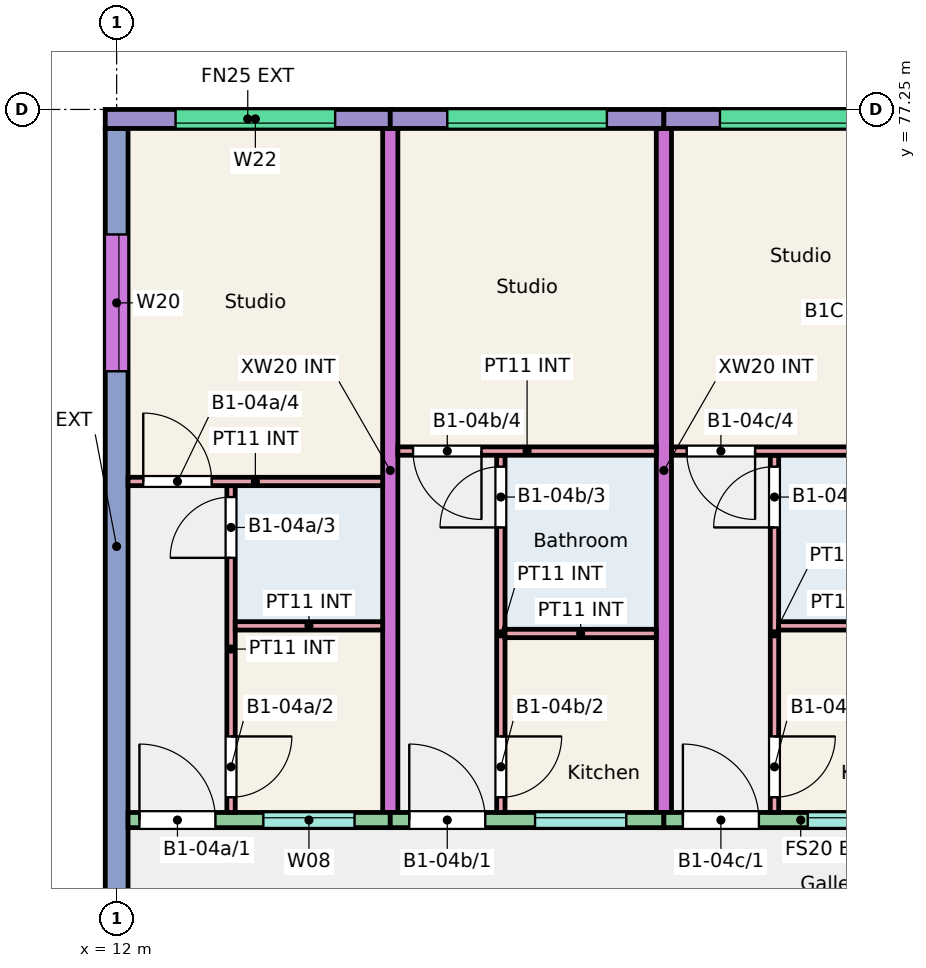
"""IFC4 building model, lengths in metres.
Left out: names, types, materials, properties, quantities, classifications, styles, units other than length and angle.
Written with IfcOpenShell. Run it as: python <this file> out.ifc"""

import sys

from ifc_helpers import new_model, si_unit, direction, frame, frame_2d, origin, place, context, subcontext, project, spatial, rectangle, extrude, element, fill, save


model = new_model("IFC4")
c1 = context("Model", 3, precision=1e-05, world=origin(), true_north=direction((0.0, 1.0)))
c2 = subcontext(c1, "Body", "Model", "MODEL_VIEW")
j1 = project(units=[si_unit("LENGTHUNIT", "METRE"), si_unit("PLANEANGLEUNIT", "RADIAN")], contexts=[c1])
p1 = place(None, origin())
s1 = spatial("IfcSite", under=j1, at=p1, CompositionType="ELEMENT")
p2 = place(p1, origin())
s2 = spatial("IfcBuilding", under=s1, at=p2, CompositionType="ELEMENT")
p3 = place(p2, frame((0.0, 0.0, 12.0)))
s3 = spatial("IfcBuildingStorey", under=s2, at=p3, CompositionType="ELEMENT", Elevation=12.0)
p4 = place(p3, frame((12.0, 66.0, 0.0), z_axis=(0.0, 0.0, 1.0), x_axis=(0.0, 1.0, 0.0)))
e1 = element("IfcWall", 1, at=p4, inside=s3, PredefinedType="SHEAR", context=c2, shape_type="SweptSolid", body=[
    extrude(rectangle(XDim=11.0, YDim=0.3, at=frame_2d((5.5, 0.0))), origin(), (0.0, 0.0, 1.0), 3.0),
])
p5 = place(p4, frame((7.805, 0.0, 0.9)))
e2 = element("IfcOpeningElement", 2, at=p5, cuts=e1, PredefinedType="OPENING", context=c2, shape_type="SweptSolid", body=[
    extrude(rectangle(XDim=1.8, YDim=1.5, at=frame_2d((0.9, 0.75))), frame((0.0, 0.16, 0.0), z_axis=(0.0, -1.0, 0.0), x_axis=(1.0, 0.0, 0.0)), (0.0, 0.0, 1.0), 0.32),
])
for number, where, z_axis, x_axis in (
    (3, (15.6, 68.0, 0.0), (0.0, 0.0, 1.0), (0.0, 1.0, 0.0)),
    (4, (19.2, 68.0, 0.0), (0.0, 0.0, 1.0), (0.0, 1.0, 0.0)),
):
    element("IfcWall", number, at=place(p3, frame(where, z_axis=z_axis, x_axis=x_axis)), inside=s3, PredefinedType="SHEAR", context=c2, shape_type="SweptSolid", body=[
        extrude(rectangle(XDim=9.0, YDim=0.2, at=frame_2d((4.5, 0.0))), origin(), (0.0, 0.0, 1.0), 3.0),
    ])
p6 = place(p3, frame((11.85, 77.125, 0.0), z_axis=(0.0, 0.0, 1.0), x_axis=(1.0, 0.0, 0.0)))
e5 = element("IfcWall", 5, at=p6, inside=s3, PredefinedType="SOLIDWALL", context=c2, shape_type="SweptSolid", body=[
    extrude(rectangle(XDim=3.75, YDim=0.25, at=frame_2d((1.875, 0.0))), origin(), (0.0, 0.0, 1.0), 3.0),
])
p7 = place(p6, frame((0.925, 0.0, 1.2)))
e6 = element("IfcOpeningElement", 6, at=p7, cuts=e5, PredefinedType="OPENING", context=c2, shape_type="SweptSolid", body=[
    extrude(rectangle(XDim=2.1, YDim=1.2, at=frame_2d((1.05, 0.6))), frame((0.0, 0.135, 0.0), z_axis=(0.0, -1.0, 0.0), x_axis=(1.0, 0.0, 0.0)), (0.0, 0.0, 1.0), 0.27),
])
p8 = place(p3, frame((12.15, 67.9, 0.0), z_axis=(0.0, 0.0, 1.0), x_axis=(1.0, 0.0, 0.0)))
e7 = element("IfcWall", 7, at=p8, inside=s3, PredefinedType="SOLIDWALL", context=c2, shape_type="SweptSolid", body=[
    extrude(rectangle(XDim=3.45, YDim=0.2, at=frame_2d((1.725, 0.0))), origin(), (0.0, 0.0, 1.0), 3.0),
])
p9 = place(p8, frame((1.78, 0.0, 1.1)))
e8 = element("IfcOpeningElement", 8, at=p9, cuts=e7, PredefinedType="OPENING", context=c2, shape_type="SweptSolid", body=[
    extrude(rectangle(XDim=1.2, YDim=1.3, at=frame_2d((0.6, 0.65))), frame((0.0, 0.11, 0.0), z_axis=(0.0, -1.0, 0.0), x_axis=(1.0, 0.0, 0.0)), (0.0, 0.0, 1.0), 0.22),
])
p10 = place(p8, frame((0.15, 0.0, 0.0)))
e9 = element("IfcOpeningElement", 9, at=p10, cuts=e7, PredefinedType="OPENING", context=c2, shape_type="SweptSolid", body=[
    extrude(rectangle(XDim=1.0, YDim=2.1, at=frame_2d((0.5, 1.05))), frame((0.0, 0.11, 0.0), z_axis=(0.0, -1.0, 0.0), x_axis=(1.0, 0.0, 0.0)), (0.0, 0.0, 1.0), 0.22),
])
p11 = place(p3, frame((15.6, 77.125, 0.0), z_axis=(0.0, 0.0, 1.0), x_axis=(1.0, 0.0, 0.0)))
e10 = element("IfcWall", 10, at=p11, inside=s3, PredefinedType="SOLIDWALL", context=c2, shape_type="SweptSolid", body=[
    extrude(rectangle(XDim=3.6, YDim=0.25, at=frame_2d((1.8, 0.0))), origin(), (0.0, 0.0, 1.0), 3.0),
])
p12 = place(p11, frame((0.75, 0.0, 1.2)))
e11 = element("IfcOpeningElement", 11, at=p12, cuts=e10, PredefinedType="OPENING", context=c2, shape_type="SweptSolid", body=[
    extrude(rectangle(XDim=2.1, YDim=1.2, at=frame_2d((1.05, 0.6))), frame((0.0, 0.135, 0.0), z_axis=(0.0, -1.0, 0.0), x_axis=(1.0, 0.0, 0.0)), (0.0, 0.0, 1.0), 0.27),
])
p13 = place(p3, frame((15.6, 67.9, 0.0), z_axis=(0.0, 0.0, 1.0), x_axis=(1.0, 0.0, 0.0)))
e12 = element("IfcWall", 12, at=p13, inside=s3, PredefinedType="SOLIDWALL", context=c2, shape_type="SweptSolid", body=[
    extrude(rectangle(XDim=3.6, YDim=0.2, at=frame_2d((1.8, 0.0))), origin(), (0.0, 0.0, 1.0), 3.0),
])
p14 = place(p13, frame((1.905, 0.0, 1.1)))
e13 = element("IfcOpeningElement", 13, at=p14, cuts=e12, PredefinedType="OPENING", context=c2, shape_type="SweptSolid", body=[
    extrude(rectangle(XDim=1.2, YDim=1.3, at=frame_2d((0.6, 0.65))), frame((0.0, 0.11, 0.0), z_axis=(0.0, -1.0, 0.0), x_axis=(1.0, 0.0, 0.0)), (0.0, 0.0, 1.0), 0.22),
])
p15 = place(p13, frame((0.25, 0.0, 0.0)))
e14 = element("IfcOpeningElement", 14, at=p15, cuts=e12, PredefinedType="OPENING", context=c2, shape_type="SweptSolid", body=[
    extrude(rectangle(XDim=1.0, YDim=2.1, at=frame_2d((0.5, 1.05))), frame((0.0, 0.11, 0.0), z_axis=(0.0, -1.0, 0.0), x_axis=(1.0, 0.0, 0.0)), (0.0, 0.0, 1.0), 0.22),
])
p16 = place(p3, frame((19.2, 77.125, 0.0), z_axis=(0.0, 0.0, 1.0), x_axis=(1.0, 0.0, 0.0)))
e15 = element("IfcWall", 15, at=p16, inside=s3, PredefinedType="SOLIDWALL", context=c2, shape_type="SweptSolid", body=[
    extrude(rectangle(XDim=3.6, YDim=0.25, at=frame_2d((1.8, 0.0))), origin(), (0.0, 0.0, 1.0), 3.0),
])
p17 = place(p16, frame((0.738, 0.0, 1.2)))
e16 = element("IfcOpeningElement", 16, at=p17, cuts=e15, PredefinedType="OPENING", context=c2, shape_type="SweptSolid", body=[
    extrude(rectangle(XDim=2.1, YDim=1.2, at=frame_2d((1.05, 0.6))), frame((0.0, 0.135, 0.0), z_axis=(0.0, -1.0, 0.0), x_axis=(1.0, 0.0, 0.0)), (0.0, 0.0, 1.0), 0.27),
])
p18 = place(p3, frame((19.2, 67.9, 0.0), z_axis=(0.0, 0.0, 1.0), x_axis=(1.0, 0.0, 0.0)))
e17 = element("IfcWall", 17, at=p18, inside=s3, PredefinedType="SOLIDWALL", context=c2, shape_type="SweptSolid", body=[
    extrude(rectangle(XDim=3.6, YDim=0.2, at=frame_2d((1.8, 0.0))), origin(), (0.0, 0.0, 1.0), 3.0),
])
p19 = place(p18, frame((1.893, 0.0, 1.1)))
e18 = element("IfcOpeningElement", 18, at=p19, cuts=e17, PredefinedType="OPENING", context=c2, shape_type="SweptSolid", body=[
    extrude(rectangle(XDim=1.2, YDim=1.3, at=frame_2d((0.6, 0.65))), frame((0.0, 0.11, 0.0), z_axis=(0.0, -1.0, 0.0), x_axis=(1.0, 0.0, 0.0)), (0.0, 0.0, 1.0), 0.22),
])
p20 = place(p18, frame((0.25, 0.0, 0.0)))
e19 = element("IfcOpeningElement", 19, at=p20, cuts=e17, PredefinedType="OPENING", context=c2, shape_type="SweptSolid", body=[
    extrude(rectangle(XDim=1.0, YDim=2.1, at=frame_2d((0.5, 1.05))), frame((0.0, 0.11, 0.0), z_axis=(0.0, -1.0, 0.0), x_axis=(1.0, 0.0, 0.0)), (0.0, 0.0, 1.0), 0.22),
])
p21 = place(p3, frame((13.505, 68.0, 0.0), z_axis=(0.0, 0.0, 1.0), x_axis=(0.0, 1.0, 0.0)))
e20 = element("IfcWall", 20, at=p21, inside=s3, PredefinedType="PARTITIONING", context=c2, shape_type="SweptSolid", body=[
    extrude(rectangle(XDim=4.3, YDim=0.11, at=frame_2d((2.15, 0.0))), origin(), (0.0, 0.0, 1.0), 2.8),
])
p22 = place(p21, frame((0.2, 0.0, 0.0)))
e21 = element("IfcOpeningElement", 21, at=p22, cuts=e20, PredefinedType="OPENING", context=c2, shape_type="SweptSolid", body=[
    extrude(rectangle(XDim=0.8, YDim=2.1, at=frame_2d((0.4, 1.05))), frame((0.0, 0.065, 0.0), z_axis=(0.0, -1.0, 0.0), x_axis=(1.0, 0.0, 0.0)), (0.0, 0.0, 1.0), 0.13),
])
p23 = place(p21, frame((3.35, 0.0, 0.0)))
e22 = element("IfcOpeningElement", 22, at=p23, cuts=e20, PredefinedType="OPENING", context=c2, shape_type="SweptSolid", body=[
    extrude(rectangle(XDim=0.8, YDim=2.1, at=frame_2d((0.4, 1.05))), frame((0.0, 0.065, 0.0), z_axis=(0.0, -1.0, 0.0), x_axis=(1.0, 0.0, 0.0)), (0.0, 0.0, 1.0), 0.13),
])
p24 = place(p3, frame((13.56, 70.455, 0.0), z_axis=(0.0, 0.0, 1.0), x_axis=(1.0, 0.0, 0.0)))
e23 = element("IfcWall", 23, at=p24, inside=s3, PredefinedType="PARTITIONING", context=c2, shape_type="SweptSolid", body=[
    extrude(rectangle(XDim=1.94, YDim=0.11, at=frame_2d((0.97, 0.0))), origin(), (0.0, 0.0, 1.0), 2.8),
])
p25 = place(p3, frame((12.15, 72.355, 0.0), z_axis=(0.0, 0.0, 1.0), x_axis=(1.0, 0.0, 0.0)))
e24 = element("IfcWall", 24, at=p25, inside=s3, PredefinedType="PARTITIONING", context=c2, shape_type="SweptSolid", body=[
    extrude(rectangle(XDim=3.35, YDim=0.11, at=frame_2d((1.675, 0.0))), origin(), (0.0, 0.0, 1.0), 2.8),
])
p26 = place(p25, frame((0.2, 0.0, 0.0)))
e25 = element("IfcOpeningElement", 25, at=p26, cuts=e24, PredefinedType="OPENING", context=c2, shape_type="SweptSolid", body=[
    extrude(rectangle(XDim=0.9, YDim=2.1, at=frame_2d((0.45, 1.05))), frame((0.0, 0.065, 0.0), z_axis=(0.0, -1.0, 0.0), x_axis=(1.0, 0.0, 0.0)), (0.0, 0.0, 1.0), 0.13),
])
p27 = place(p3, frame((17.055, 68.0, 0.0), z_axis=(0.0, 0.0, 1.0), x_axis=(0.0, 1.0, 0.0)))
e26 = element("IfcWall", 26, at=p27, inside=s3, PredefinedType="PARTITIONING", context=c2, shape_type="SweptSolid", body=[
    extrude(rectangle(XDim=4.7, YDim=0.11, at=frame_2d((2.35, 0.0))), origin(), (0.0, 0.0, 1.0), 2.8),
])
p28 = place(p27, frame((0.2, 0.0, 0.0)))
e27 = element("IfcOpeningElement", 27, at=p28, cuts=e26, PredefinedType="OPENING", context=c2, shape_type="SweptSolid", body=[
    extrude(rectangle(XDim=0.8, YDim=2.1, at=frame_2d((0.4, 1.05))), frame((0.0, 0.065, 0.0), z_axis=(0.0, -1.0, 0.0), x_axis=(1.0, 0.0, 0.0)), (0.0, 0.0, 1.0), 0.13),
])
p29 = place(p27, frame((3.75, 0.0, 0.0)))
e28 = element("IfcOpeningElement", 28, at=p29, cuts=e26, PredefinedType="OPENING", context=c2, shape_type="SweptSolid", body=[
    extrude(rectangle(XDim=0.8, YDim=2.1, at=frame_2d((0.4, 1.05))), frame((0.0, 0.065, 0.0), z_axis=(0.0, -1.0, 0.0), x_axis=(1.0, 0.0, 0.0)), (0.0, 0.0, 1.0), 0.13),
])
p30 = place(p3, frame((17.11, 70.355, 0.0), z_axis=(0.0, 0.0, 1.0), x_axis=(1.0, 0.0, 0.0)))
e29 = element("IfcWall", 29, at=p30, inside=s3, PredefinedType="PARTITIONING", context=c2, shape_type="SweptSolid", body=[
    extrude(rectangle(XDim=1.99, YDim=0.11, at=frame_2d((0.995, 0.0))), origin(), (0.0, 0.0, 1.0), 2.8),
])
p31 = place(p3, frame((15.7, 72.755, 0.0), z_axis=(0.0, 0.0, 1.0), x_axis=(1.0, 0.0, 0.0)))
e30 = element("IfcWall", 30, at=p31, inside=s3, PredefinedType="PARTITIONING", context=c2, shape_type="SweptSolid", body=[
    extrude(rectangle(XDim=3.4, YDim=0.11, at=frame_2d((1.7, 0.0))), origin(), (0.0, 0.0, 1.0), 2.8),
])
p32 = place(p31, frame((0.2, 0.0, 0.0)))
e31 = element("IfcOpeningElement", 31, at=p32, cuts=e30, PredefinedType="OPENING", context=c2, shape_type="SweptSolid", body=[
    extrude(rectangle(XDim=0.9, YDim=2.1, at=frame_2d((0.45, 1.05))), frame((0.0, 0.065, 0.0), z_axis=(0.0, -1.0, 0.0), x_axis=(1.0, 0.0, 0.0)), (0.0, 0.0, 1.0), 0.13),
])
p33 = place(p3, frame((20.655, 68.0, 0.0), z_axis=(0.0, 0.0, 1.0), x_axis=(0.0, 1.0, 0.0)))
e32 = element("IfcWall", 32, at=p33, inside=s3, PredefinedType="PARTITIONING", context=c2, shape_type="SweptSolid", body=[
    extrude(rectangle(XDim=4.7, YDim=0.11, at=frame_2d((2.35, 0.0))), origin(), (0.0, 0.0, 1.0), 2.8),
])
p34 = place(p33, frame((0.2, 0.0, 0.0)))
e33 = element("IfcOpeningElement", 33, at=p34, cuts=e32, PredefinedType="OPENING", context=c2, shape_type="SweptSolid", body=[
    extrude(rectangle(XDim=0.8, YDim=2.1, at=frame_2d((0.4, 1.05))), frame((0.0, 0.065, 0.0), z_axis=(0.0, -1.0, 0.0), x_axis=(1.0, 0.0, 0.0)), (0.0, 0.0, 1.0), 0.13),
])
p35 = place(p33, frame((3.75, 0.0, 0.0)))
e34 = element("IfcOpeningElement", 34, at=p35, cuts=e32, PredefinedType="OPENING", context=c2, shape_type="SweptSolid", body=[
    extrude(rectangle(XDim=0.8, YDim=2.1, at=frame_2d((0.4, 1.05))), frame((0.0, 0.065, 0.0), z_axis=(0.0, -1.0, 0.0), x_axis=(1.0, 0.0, 0.0)), (0.0, 0.0, 1.0), 0.13),
])
p36 = place(p3, frame((20.71, 70.455, 0.0), z_axis=(0.0, 0.0, 1.0), x_axis=(1.0, 0.0, 0.0)))
e35 = element("IfcWall", 35, at=p36, inside=s3, PredefinedType="PARTITIONING", context=c2, shape_type="SweptSolid", body=[
    extrude(rectangle(XDim=1.965, YDim=0.11, at=frame_2d((0.982, 0.0))), origin(), (0.0, 0.0, 1.0), 2.8),
])
p37 = place(p3, frame((19.3, 72.755, 0.0), z_axis=(0.0, 0.0, 1.0), x_axis=(1.0, 0.0, 0.0)))
e36 = element("IfcWall", 36, at=p37, inside=s3, PredefinedType="PARTITIONING", context=c2, shape_type="SweptSolid", body=[
    extrude(rectangle(XDim=3.375, YDim=0.11, at=frame_2d((1.688, 0.0))), origin(), (0.0, 0.0, 1.0), 2.8),
])
p38 = place(p37, frame((0.2, 0.0, 0.0)))
e37 = element("IfcOpeningElement", 37, at=p38, cuts=e36, PredefinedType="OPENING", context=c2, shape_type="SweptSolid", body=[
    extrude(rectangle(XDim=0.9, YDim=2.1, at=frame_2d((0.45, 1.05))), frame((0.0, 0.065, 0.0), z_axis=(0.0, -1.0, 0.0), x_axis=(1.0, 0.0, 0.0)), (0.0, 0.0, 1.0), 0.13),
])
p39 = place(p9, origin())
e38 = element("IfcWindow", 38, at=p39, inside=s3, PartitioningType="SINGLE_PANEL", PredefinedType="WINDOW", context=c2, shape_type="SweptSolid", body=[
    extrude(rectangle(XDim=1.2, YDim=1.3, at=frame_2d((0.6, 0.65))), frame((0.0, 0.06, 0.0), z_axis=(0.0, -1.0, 0.0), x_axis=(1.0, 0.0, 0.0)), (0.0, 0.0, 1.0), 0.06),
])
fill(e8, e38)
p40 = place(p7, origin())
e39 = element("IfcWindow", 39, at=p40, inside=s3, PartitioningType="SINGLE_PANEL", PredefinedType="WINDOW", context=c2, shape_type="SweptSolid", body=[
    extrude(rectangle(XDim=2.1, YDim=1.2, at=frame_2d((1.05, 0.6))), frame((0.0, -0.025, 0.0), z_axis=(0.0, -1.0, 0.0), x_axis=(1.0, 0.0, 0.0)), (0.0, 0.0, 1.0), 0.06),
])
fill(e6, e39)
p41 = place(p5, origin())
e40 = element("IfcWindow", 40, at=p41, inside=s3, PartitioningType="SINGLE_PANEL", PredefinedType="WINDOW", context=c2, shape_type="SweptSolid", body=[
    extrude(rectangle(XDim=1.8, YDim=1.5, at=frame_2d((0.9, 0.75))), frame((0.0, 0.0, 0.0), z_axis=(0.0, -1.0, 0.0), x_axis=(1.0, 0.0, 0.0)), (0.0, 0.0, 1.0), 0.06),
])
fill(e2, e40)
p42 = place(p14, origin())
e41 = element("IfcWindow", 41, at=p42, inside=s3, PartitioningType="SINGLE_PANEL", PredefinedType="WINDOW", context=c2, shape_type="SweptSolid", body=[
    extrude(rectangle(XDim=1.2, YDim=1.3, at=frame_2d((0.6, 0.65))), frame((0.0, 0.06, 0.0), z_axis=(0.0, -1.0, 0.0), x_axis=(1.0, 0.0, 0.0)), (0.0, 0.0, 1.0), 0.06),
])
fill(e13, e41)
p43 = place(p12, origin())
e42 = element("IfcWindow", 42, at=p43, inside=s3, PartitioningType="SINGLE_PANEL", PredefinedType="WINDOW", context=c2, shape_type="SweptSolid", body=[
    extrude(rectangle(XDim=2.1, YDim=1.2, at=frame_2d((1.05, 0.6))), frame((0.0, -0.025, 0.0), z_axis=(0.0, -1.0, 0.0), x_axis=(1.0, 0.0, 0.0)), (0.0, 0.0, 1.0), 0.06),
])
fill(e11, e42)
p44 = place(p19, origin())
e43 = element("IfcWindow", 43, at=p44, inside=s3, PartitioningType="SINGLE_PANEL", PredefinedType="WINDOW", context=c2, shape_type="SweptSolid", body=[
    extrude(rectangle(XDim=1.2, YDim=1.3, at=frame_2d((0.6, 0.65))), frame((0.0, 0.06, 0.0), z_axis=(0.0, -1.0, 0.0), x_axis=(1.0, 0.0, 0.0)), (0.0, 0.0, 1.0), 0.06),
])
fill(e18, e43)
p45 = place(p17, origin())
e44 = element("IfcWindow", 44, at=p45, inside=s3, PartitioningType="SINGLE_PANEL", PredefinedType="WINDOW", context=c2, shape_type="SweptSolid", body=[
    extrude(rectangle(XDim=2.1, YDim=1.2, at=frame_2d((1.05, 0.6))), frame((0.0, -0.025, 0.0), z_axis=(0.0, -1.0, 0.0), x_axis=(1.0, 0.0, 0.0)), (0.0, 0.0, 1.0), 0.06),
])
fill(e16, e44)
p46 = place(p10, origin())
e45 = element("IfcDoor", 45, at=p46, inside=s3, OperationType="SINGLE_SWING_LEFT", PredefinedType="DOOR", context=c2, shape_type="SweptSolid", body=[
    extrude(rectangle(XDim=1.0, YDim=2.1, at=frame_2d((0.5, 1.05))), frame((0.0, 0.025, 0.0), z_axis=(0.0, -1.0, 0.0), x_axis=(1.0, 0.0, 0.0)), (0.0, 0.0, 1.0), 0.05),
])
fill(e9, e45)
p47 = place(p22, origin())
e46 = element("IfcDoor", 46, at=p47, inside=s3, OperationType="SINGLE_SWING_RIGHT", PredefinedType="DOOR", context=c2, shape_type="SweptSolid", body=[
    extrude(rectangle(XDim=0.8, YDim=2.1, at=frame_2d((0.4, 1.05))), frame((0.0, 0.025, 0.0), z_axis=(0.0, -1.0, 0.0), x_axis=(1.0, 0.0, 0.0)), (0.0, 0.0, 1.0), 0.05),
])
fill(e21, e46)
p48 = place(p23, origin())
e47 = element("IfcDoor", 47, at=p48, inside=s3, OperationType="SINGLE_SWING_LEFT", PredefinedType="DOOR", context=c2, shape_type="SweptSolid", body=[
    extrude(rectangle(XDim=0.8, YDim=2.1, at=frame_2d((0.4, 1.05))), frame((0.0, 0.025, 0.0), z_axis=(0.0, -1.0, 0.0), x_axis=(1.0, 0.0, 0.0)), (0.0, 0.0, 1.0), 0.05),
])
fill(e22, e47)
p49 = place(p26, origin())
e48 = element("IfcDoor", 48, at=p49, inside=s3, OperationType="SINGLE_SWING_LEFT", PredefinedType="DOOR", context=c2, shape_type="SweptSolid", body=[
    extrude(rectangle(XDim=0.9, YDim=2.1, at=frame_2d((0.45, 1.05))), frame((0.0, 0.025, 0.0), z_axis=(0.0, -1.0, 0.0), x_axis=(1.0, 0.0, 0.0)), (0.0, 0.0, 1.0), 0.05),
])
fill(e25, e48)
p50 = place(p15, origin())
e49 = element("IfcDoor", 49, at=p50, inside=s3, OperationType="SINGLE_SWING_LEFT", PredefinedType="DOOR", context=c2, shape_type="SweptSolid", body=[
    extrude(rectangle(XDim=1.0, YDim=2.1, at=frame_2d((0.5, 1.05))), frame((0.0, 0.025, 0.0), z_axis=(0.0, -1.0, 0.0), x_axis=(1.0, 0.0, 0.0)), (0.0, 0.0, 1.0), 0.05),
])
fill(e14, e49)
p51 = place(p28, origin())
e50 = element("IfcDoor", 50, at=p51, inside=s3, OperationType="SINGLE_SWING_RIGHT", PredefinedType="DOOR", context=c2, shape_type="SweptSolid", body=[
    extrude(rectangle(XDim=0.8, YDim=2.1, at=frame_2d((0.4, 1.05))), frame((0.0, 0.025, 0.0), z_axis=(0.0, -1.0, 0.0), x_axis=(1.0, 0.0, 0.0)), (0.0, 0.0, 1.0), 0.05),
])
fill(e27, e50)
p52 = place(p29, origin())
e51 = element("IfcDoor", 51, at=p52, inside=s3, OperationType="SINGLE_SWING_LEFT", PredefinedType="DOOR", context=c2, shape_type="SweptSolid", body=[
    extrude(rectangle(XDim=0.8, YDim=2.1, at=frame_2d((0.4, 1.05))), frame((0.0, 0.025, 0.0), z_axis=(0.0, -1.0, 0.0), x_axis=(1.0, 0.0, 0.0)), (0.0, 0.0, 1.0), 0.05),
])
fill(e28, e51)
p53 = place(p32, origin())
e52 = element("IfcDoor", 52, at=p53, inside=s3, OperationType="SINGLE_SWING_RIGHT", PredefinedType="DOOR", context=c2, shape_type="SweptSolid", body=[
    extrude(rectangle(XDim=0.9, YDim=2.1, at=frame_2d((0.45, 1.05))), frame((0.0, 0.025, 0.0), z_axis=(0.0, -1.0, 0.0), x_axis=(1.0, 0.0, 0.0)), (0.0, 0.0, 1.0), 0.05),
])
fill(e31, e52)
p54 = place(p20, origin())
e53 = element("IfcDoor", 53, at=p54, inside=s3, OperationType="SINGLE_SWING_LEFT", PredefinedType="DOOR", context=c2, shape_type="SweptSolid", body=[
    extrude(rectangle(XDim=1.0, YDim=2.1, at=frame_2d((0.5, 1.05))), frame((0.0, 0.025, 0.0), z_axis=(0.0, -1.0, 0.0), x_axis=(1.0, 0.0, 0.0)), (0.0, 0.0, 1.0), 0.05),
])
fill(e19, e53)
p55 = place(p34, origin())
e54 = element("IfcDoor", 54, at=p55, inside=s3, OperationType="SINGLE_SWING_RIGHT", PredefinedType="DOOR", context=c2, shape_type="SweptSolid", body=[
    extrude(rectangle(XDim=0.8, YDim=2.1, at=frame_2d((0.4, 1.05))), frame((0.0, 0.025, 0.0), z_axis=(0.0, -1.0, 0.0), x_axis=(1.0, 0.0, 0.0)), (0.0, 0.0, 1.0), 0.05),
])
fill(e33, e54)
p56 = place(p35, origin())
e55 = element("IfcDoor", 55, at=p56, inside=s3, OperationType="SINGLE_SWING_LEFT", PredefinedType="DOOR", context=c2, shape_type="SweptSolid", body=[
    extrude(rectangle(XDim=0.8, YDim=2.1, at=frame_2d((0.4, 1.05))), frame((0.0, 0.025, 0.0), z_axis=(0.0, -1.0, 0.0), x_axis=(1.0, 0.0, 0.0)), (0.0, 0.0, 1.0), 0.05),
])
fill(e34, e55)
p57 = place(p38, origin())
e56 = element("IfcDoor", 56, at=p57, inside=s3, OperationType="SINGLE_SWING_RIGHT", PredefinedType="DOOR", context=c2, shape_type="SweptSolid", body=[
    extrude(rectangle(XDim=0.9, YDim=2.1, at=frame_2d((0.45, 1.05))), frame((0.0, 0.025, 0.0), z_axis=(0.0, -1.0, 0.0), x_axis=(1.0, 0.0, 0.0)), (0.0, 0.0, 1.0), 0.05),
])
fill(e37, e56)
save(model, sys.argv[1])
